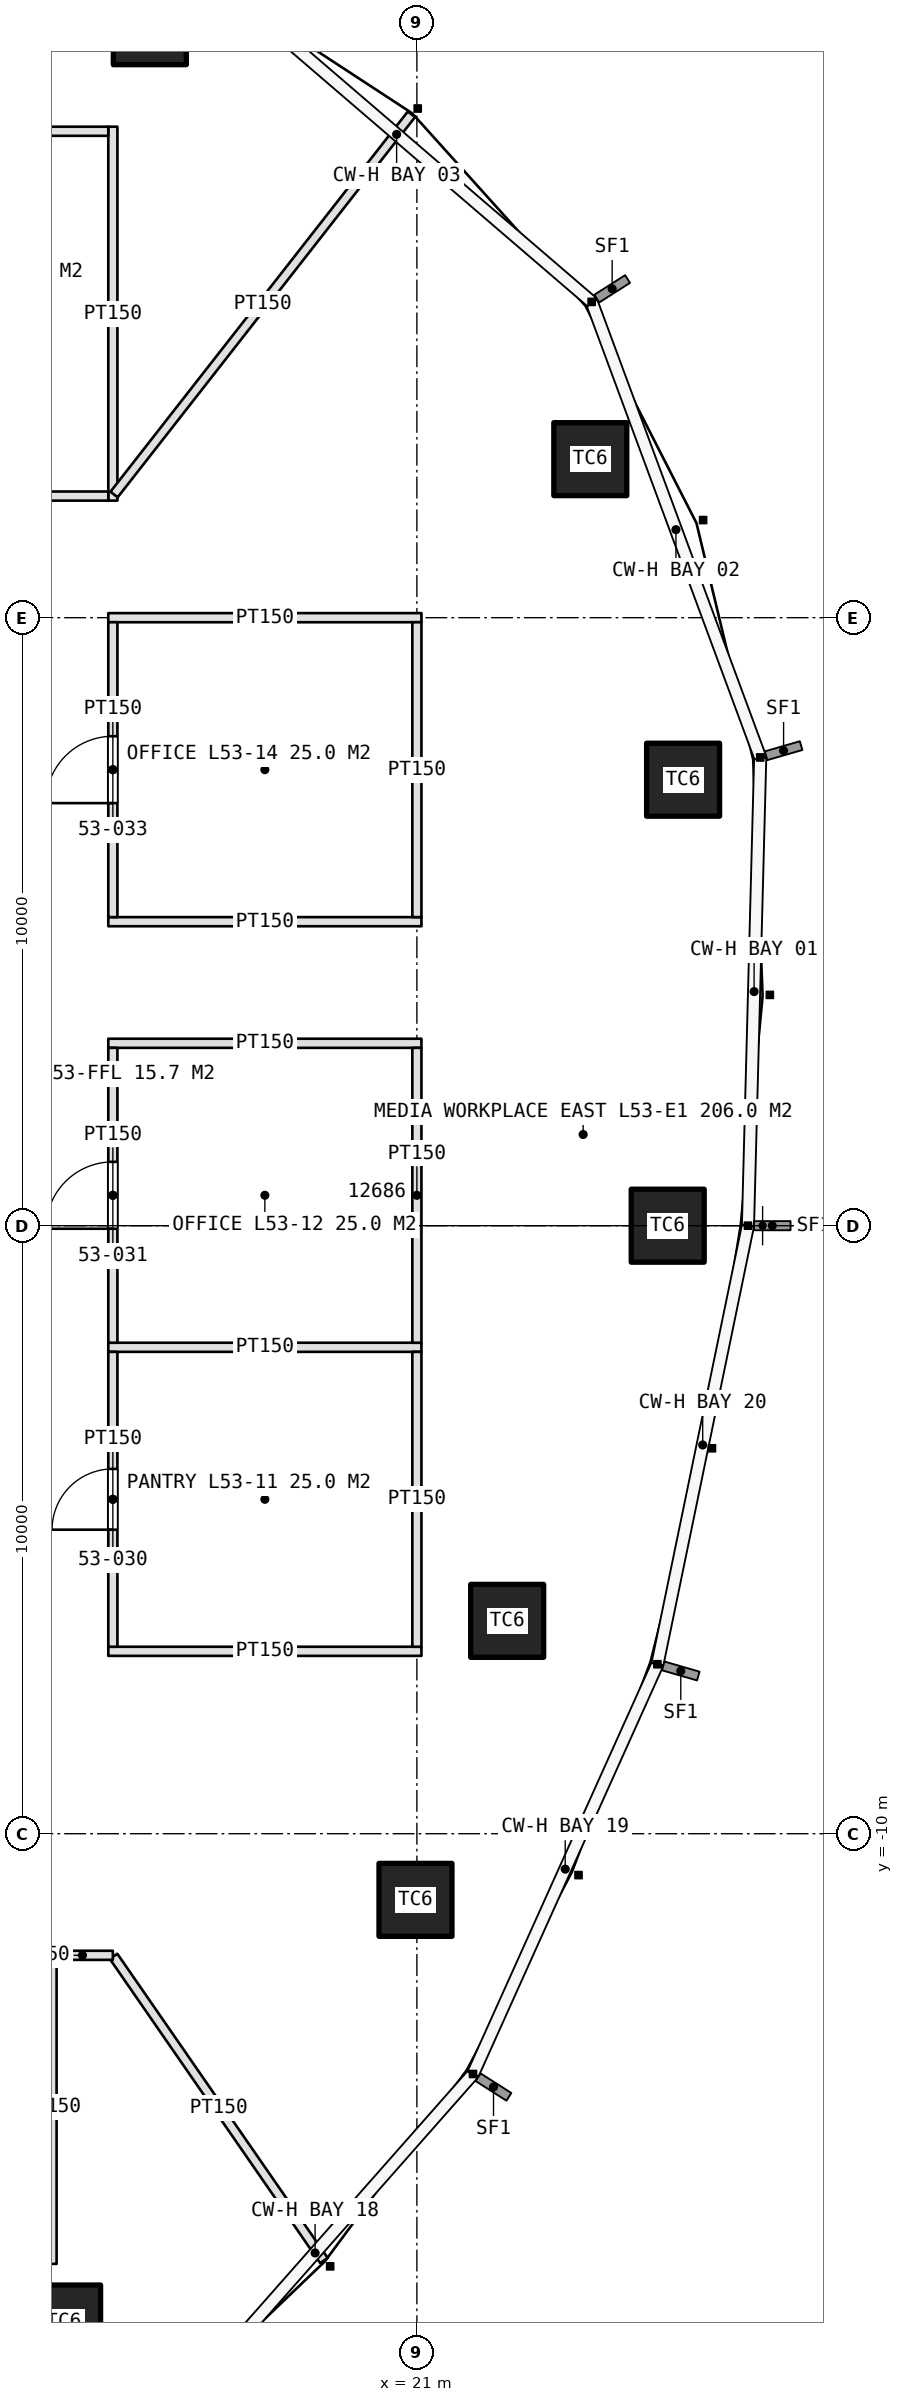
"""IFC4 building model, lengths in metres.
Left out: names, types, materials, properties, quantities, classifications, styles, units other than length and angle.
Written with IfcOpenShell. Run it as: python <this file> out.ifc"""

import sys

from ifc_helpers import new_model, si_unit, direction, frame, frame_2d, origin, origin_2d, place, context, subcontext, project, spatial, rectangle, extrude, element, fill, save


model = new_model("IFC4")
c1 = context("Model", 3, precision=1e-05, world=origin(), true_north=direction((0.0, 1.0)))
c2 = subcontext(c1, "Body", "Model", "MODEL_VIEW")
j1 = project(units=[si_unit("LENGTHUNIT", "METRE"), si_unit("PLANEANGLEUNIT", "RADIAN")], contexts=[c1])
p1 = place(None, origin())
s1 = spatial("IfcSite", under=j1, at=p1, CompositionType="ELEMENT")
p2 = place(p1, origin())
s2 = spatial("IfcBuilding", under=s1, at=p2, CompositionType="ELEMENT")
p3 = place(p2, frame((0.0, 0.0, 241.0)))
s3 = spatial("IfcBuildingStorey", under=s2, at=p3, CompositionType="ELEMENT", Elevation=241.0)
for number, where, z_axis, x_axis in (
    (1, (25.125, 0.0, 0.0), (0.0, 0.0, 1.0), (1.0, 0.0, 0.0)),
    (2, (25.378, 7.335, 0.0), (0.0, 0.0, 1.0), (1.0, 0.0, 0.0)),
    (3, (23.852, 12.607, 0.0), (0.0, 0.0, 1.0), (1.0, 0.0, 0.0)),
    (4, (16.608, 19.695, 0.0), (0.0, 0.0, 1.0), (1.0, 0.0, 0.0)),
    (5, (15.198, -18.023, 0.0), (0.0, 0.0, 1.0), (1.0, 0.0, 0.0)),
    (6, (20.977, -11.088, 0.0), (0.0, 0.0, 1.0), (1.0, 0.0, 0.0)),
    (7, (22.485, -6.499, 0.0), (0.0, 0.0, 1.0), (1.0, 0.0, 0.0)),
):
    element("IfcColumn", number, at=place(p3, frame(where, z_axis=z_axis, x_axis=x_axis)), inside=s3, PredefinedType="COLUMN", context=c2, shape_type="SweptSolid", body=[
        extrude(rectangle(XDim=1.2, YDim=1.2, at=origin_2d()), origin(), (0.0, 0.0, 1.0), 4.2),
    ])
p4 = place(p3, frame((16.0, 11.925, 0.0), z_axis=(0.0, 0.0, 1.0), x_axis=(0.0, 1.0, 0.0)))
e8 = element("IfcWall", 8, at=p4, inside=s3, PredefinedType="PARTITIONING", context=c2, shape_type="SweptSolid", body=[
    extrude(rectangle(XDim=6.15, YDim=0.15, at=frame_2d((3.075, 0.0))), origin(), (0.0, 0.0, 1.0), 3.0),
])
p5 = place(p3, frame((11.075, 12.0, 0.0), z_axis=(0.0, 0.0, 1.0), x_axis=(1.0, 0.0, 0.0)))
e9 = element("IfcWall", 9, at=p5, inside=s3, PredefinedType="PARTITIONING", context=c2, shape_type="SweptSolid", body=[
    extrude(rectangle(XDim=4.85, YDim=0.15, at=frame_2d((2.425, 0.0))), origin(), (0.0, 0.0, 1.0), 3.0),
])
p6 = place(p5, frame((1.875, 0.0, 0.0)))
e10 = element("IfcOpeningElement", 10, at=p6, cuts=e9, PredefinedType="OPENING", context=c2, shape_type="SweptSolid", body=[
    extrude(rectangle(XDim=1.1, YDim=2.3, at=frame_2d((0.55, 1.15))), frame((0.0, 0.085, 0.0), z_axis=(0.0, -1.0, 0.0), x_axis=(1.0, 0.0, 0.0)), (0.0, 0.0, 1.0), 0.17),
])
p7 = place(p3, frame((11.075, 18.0, 0.0), z_axis=(0.0, 0.0, 1.0), x_axis=(1.0, 0.0, 0.0)))
e11 = element("IfcWall", 11, at=p7, inside=s3, PredefinedType="PARTITIONING", context=c2, shape_type="SweptSolid", body=[
    extrude(rectangle(XDim=4.85, YDim=0.15, at=frame_2d((2.425, 0.0))), origin(), (0.0, 0.0, 1.0), 3.0),
])
for number, where, z_axis, x_axis in (
    (12, (15.925, -7.0, 0.0), (0.0, 0.0, 1.0), (1.0, 0.0, 0.0)),
    (13, (15.925, -2.0, 0.0), (0.0, 0.0, 1.0), (1.0, 0.0, 0.0)),
    (14, (15.925, 3.0, 0.0), (0.0, 0.0, 1.0), (1.0, 0.0, 0.0)),
):
    element("IfcWall", number, at=place(p3, frame(where, z_axis=z_axis, x_axis=x_axis)), inside=s3, PredefinedType="PARTITIONING", context=c2, shape_type="SweptSolid", body=[
        extrude(rectangle(XDim=5.15, YDim=0.15, at=frame_2d((2.575, 0.0))), origin(), (0.0, 0.0, 1.0), 3.0),
    ])
p8 = place(p3, frame((16.0, -6.925, 0.0), z_axis=(0.0, 0.0, 1.0), x_axis=(0.0, 1.0, 0.0)))
e15 = element("IfcWall", 15, at=p8, inside=s3, PredefinedType="PARTITIONING", context=c2, shape_type="SweptSolid", body=[
    extrude(rectangle(XDim=4.85, YDim=0.15, at=frame_2d((2.425, 0.0))), origin(), (0.0, 0.0, 1.0), 3.0),
])
p9 = place(p8, frame((1.925, 0.0, 0.0)))
e16 = element("IfcOpeningElement", 16, at=p9, cuts=e15, PredefinedType="OPENING", context=c2, shape_type="SweptSolid", body=[
    extrude(rectangle(XDim=1.0, YDim=2.2, at=frame_2d((0.5, 1.1))), frame((0.0, 0.085, 0.0), z_axis=(0.0, -1.0, 0.0), x_axis=(1.0, 0.0, 0.0)), (0.0, 0.0, 1.0), 0.17),
])
p10 = place(p3, frame((21.0, -6.925, 0.0), z_axis=(0.0, 0.0, 1.0), x_axis=(0.0, 1.0, 0.0)))
e17 = element("IfcWall", 17, at=p10, inside=s3, PredefinedType="PARTITIONING", context=c2, shape_type="SweptSolid", body=[
    extrude(rectangle(XDim=4.85, YDim=0.15, at=frame_2d((2.425, 0.0))), origin(), (0.0, 0.0, 1.0), 3.0),
])
p11 = place(p3, frame((16.0, -1.925, 0.0), z_axis=(0.0, 0.0, 1.0), x_axis=(0.0, 1.0, 0.0)))
e18 = element("IfcWall", 18, at=p11, inside=s3, PredefinedType="PARTITIONING", context=c2, shape_type="SweptSolid", body=[
    extrude(rectangle(XDim=4.85, YDim=0.15, at=frame_2d((2.425, 0.0))), origin(), (0.0, 0.0, 1.0), 3.0),
])
p12 = place(p11, frame((1.875, 0.0, 0.0)))
e19 = element("IfcOpeningElement", 19, at=p12, cuts=e18, PredefinedType="OPENING", context=c2, shape_type="SweptSolid", body=[
    extrude(rectangle(XDim=1.1, YDim=2.3, at=frame_2d((0.55, 1.15))), frame((0.0, 0.085, 0.0), z_axis=(0.0, -1.0, 0.0), x_axis=(1.0, 0.0, 0.0)), (0.0, 0.0, 1.0), 0.17),
])
p13 = place(p3, frame((21.0, -1.925, 0.0), z_axis=(0.0, 0.0, 1.0), x_axis=(0.0, 1.0, 0.0)))
e20 = element("IfcWall", 20, at=p13, inside=s3, PredefinedType="PARTITIONING", context=c2, shape_type="SweptSolid", body=[
    extrude(rectangle(XDim=4.85, YDim=0.15, at=frame_2d((2.425, 0.0))), origin(), (0.0, 0.0, 1.0), 3.0),
])
for number, where, z_axis, x_axis in (
    (21, (15.0, -11.925, 0.0), (0.0, 0.0, 1.0), (0.0, -1.0, 0.0)),
    (22, (15.925, 5.0, 0.0), (0.0, 0.0, 1.0), (1.0, 0.0, 0.0)),
    (23, (15.925, 10.0, 0.0), (0.0, 0.0, 1.0), (1.0, 0.0, 0.0)),
):
    element("IfcWall", number, at=place(p3, frame(where, z_axis=z_axis, x_axis=x_axis)), inside=s3, PredefinedType="PARTITIONING", context=c2, shape_type="SweptSolid", body=[
        extrude(rectangle(XDim=5.15, YDim=0.15, at=frame_2d((2.575, 0.0))), origin(), (0.0, 0.0, 1.0), 3.0),
    ])
p14 = place(p3, frame((16.0, 5.075, 0.0), z_axis=(0.0, 0.0, 1.0), x_axis=(0.0, 1.0, 0.0)))
e24 = element("IfcWall", 24, at=p14, inside=s3, PredefinedType="PARTITIONING", context=c2, shape_type="SweptSolid", body=[
    extrude(rectangle(XDim=4.85, YDim=0.15, at=frame_2d((2.425, 0.0))), origin(), (0.0, 0.0, 1.0), 3.0),
])
p15 = place(p14, frame((1.875, 0.0, 0.0)))
e25 = element("IfcOpeningElement", 25, at=p15, cuts=e24, PredefinedType="OPENING", context=c2, shape_type="SweptSolid", body=[
    extrude(rectangle(XDim=1.1, YDim=2.3, at=frame_2d((0.55, 1.15))), frame((0.0, 0.085, 0.0), z_axis=(0.0, -1.0, 0.0), x_axis=(1.0, 0.0, 0.0)), (0.0, 0.0, 1.0), 0.17),
])
p16 = place(p3, frame((21.0, 5.075, 0.0), z_axis=(0.0, 0.0, 1.0), x_axis=(0.0, 1.0, 0.0)))
e26 = element("IfcWall", 26, at=p16, inside=s3, PredefinedType="PARTITIONING", context=c2, shape_type="SweptSolid", body=[
    extrude(rectangle(XDim=4.85, YDim=0.15, at=frame_2d((2.425, 0.0))), origin(), (0.0, 0.0, 1.0), 3.0),
])
p17 = place(p3, frame((16.011, -12.016, 0.0), z_axis=(0.0, 0.0, 1.0), x_axis=(0.568863489071, -0.822431961199, 0.0)))
e27 = element("IfcWall", 27, at=p17, inside=s3, PredefinedType="PARTITIONING", context=c2, shape_type="SweptSolid", body=[
    extrude(rectangle(XDim=6.083, YDim=0.15, at=frame_2d((3.042, 0.0))), origin(), (0.0, 0.0, 1.0), 3.0),
])
p18 = place(p3, frame((16.02, 12.026, 0.0), z_axis=(0.0, 0.0, 1.0), x_axis=(0.616031272047, 0.787721696959, 0.0)))
e28 = element("IfcWall", 28, at=p18, inside=s3, PredefinedType="PARTITIONING", context=c2, shape_type="SweptSolid", body=[
    extrude(rectangle(XDim=7.939, YDim=0.15, at=frame_2d((3.969, 0.0))), origin(), (0.0, 0.0, 1.0), 3.0),
])
p19 = place(p3, frame((15.0, -12.0, 0.0), z_axis=(0.0, 0.0, 1.0), x_axis=(1.0, 0.0, 0.0)))
e29 = element("IfcWall", 29, at=p19, inside=s3, PredefinedType="PARTITIONING", context=c2, shape_type="SweptSolid", body=[
    extrude(rectangle(XDim=1.0, YDim=0.15, at=frame_2d((0.5, 0.0))), origin(), (0.0, 0.0, 1.0), 3.0),
])
p20 = place(p9, origin())
e30 = element("IfcDoor", 30, at=p20, inside=s3, OperationType="SINGLE_SWING_LEFT", PredefinedType="DOOR", context=c2, shape_type="SweptSolid", body=[
    extrude(rectangle(XDim=1.0, YDim=2.2, at=frame_2d((0.5, 1.1))), frame((0.0, 0.025, 0.0), z_axis=(0.0, -1.0, 0.0), x_axis=(1.0, 0.0, 0.0)), (0.0, 0.0, 1.0), 0.05),
])
fill(e16, e30)
p21 = place(p12, origin())
e31 = element("IfcDoor", 31, at=p21, inside=s3, OperationType="SINGLE_SWING_LEFT", PredefinedType="DOOR", context=c2, shape_type="SweptSolid", body=[
    extrude(rectangle(XDim=1.1, YDim=2.3, at=frame_2d((0.55, 1.15))), frame((0.0, 0.025, 0.0), z_axis=(0.0, -1.0, 0.0), x_axis=(1.0, 0.0, 0.0)), (0.0, 0.0, 1.0), 0.05),
])
fill(e19, e31)
p22 = place(p15, origin())
e32 = element("IfcDoor", 32, at=p22, inside=s3, OperationType="SINGLE_SWING_LEFT", PredefinedType="DOOR", context=c2, shape_type="SweptSolid", body=[
    extrude(rectangle(XDim=1.1, YDim=2.3, at=frame_2d((0.55, 1.15))), frame((0.0, 0.025, 0.0), z_axis=(0.0, -1.0, 0.0), x_axis=(1.0, 0.0, 0.0)), (0.0, 0.0, 1.0), 0.05),
])
fill(e25, e32)
save(model, sys.argv[1])
